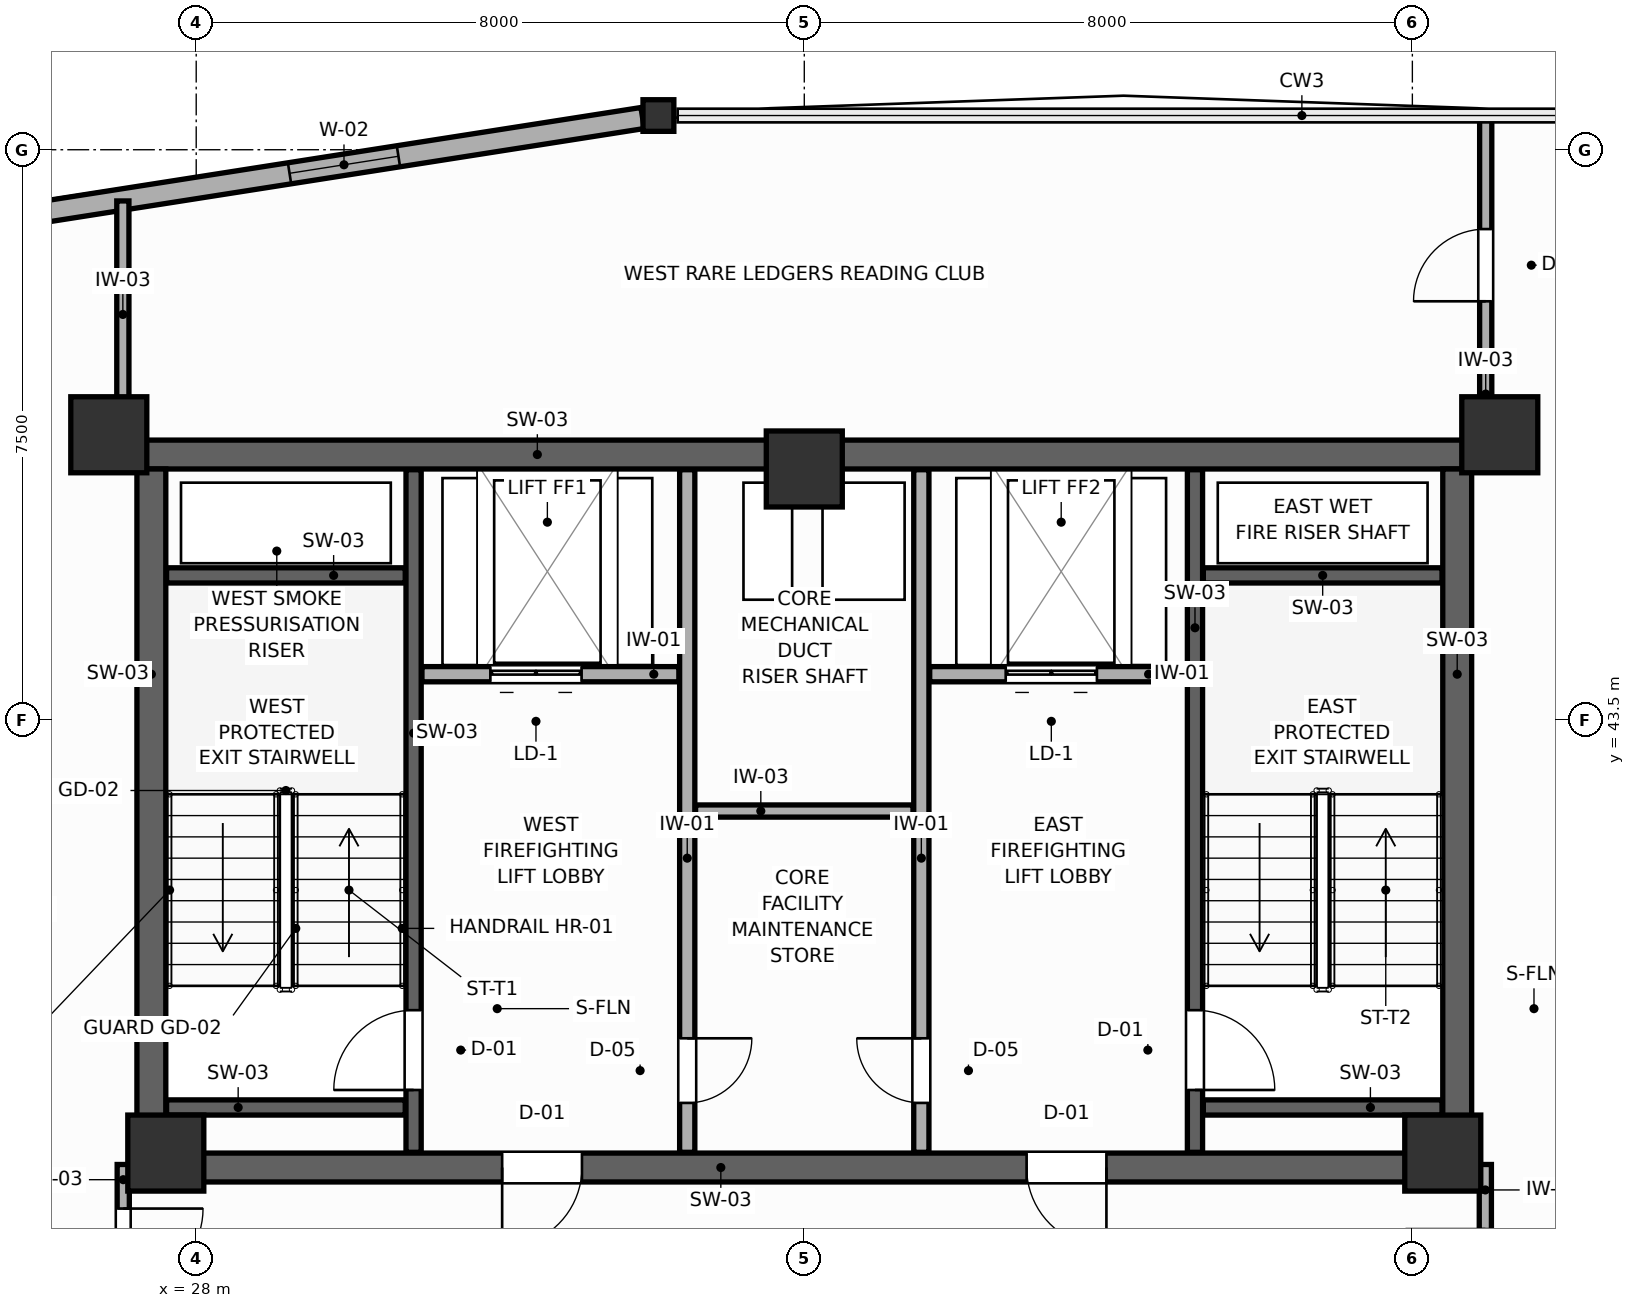
"""IFC4 building model, lengths in metres.
Left out: names, types, materials, properties, quantities, classifications, styles, units other than length and angle.
Written with IfcOpenShell. Run it as: python <this file> out.ifc"""

import sys

from ifc_helpers import new_model, si_unit, direction, frame, frame_2d, origin, origin_2d, place, context, subcontext, project, spatial, rectangle, i_section, extrude, source, transform, mapped, element, fill, save


model = new_model("IFC4")
c1 = context("Model", 3, precision=1e-05, world=origin(), true_north=direction((0.0, 1.0)))
c2 = subcontext(c1, "Body", "Model", "MODEL_VIEW")
j1 = project(units=[si_unit("LENGTHUNIT", "METRE"), si_unit("PLANEANGLEUNIT", "RADIAN")], contexts=[c1])
p1 = place(None, origin())
s1 = spatial("IfcSite", under=j1, at=p1, CompositionType="ELEMENT")
p2 = place(p1, origin())
s2 = spatial("IfcBuilding", under=s1, at=p2, CompositionType="ELEMENT")
p3 = place(p2, frame((0.0, 0.0, 216.6)))
s3 = spatial("IfcBuildingStorey", under=s2, at=p3, CompositionType="ELEMENT", Elevation=216.6)
p4 = place(p3, frame((27.22, 46.99, 0.0), z_axis=(0.0, 0.0, 1.0), x_axis=(1.0, 0.0, 0.0)))
e1 = element("IfcWall", 1, at=p4, inside=s3, PredefinedType="SHEAR", context=c2, shape_type="SweptSolid", body=[
    extrude(rectangle(XDim=17.56, YDim=0.38, at=frame_2d((8.78, 0.0))), origin(), (0.0, 0.0, 1.0), 3.6),
])
p5 = place(p3, frame((27.22, 37.61, 0.0), z_axis=(0.0, 0.0, 1.0), x_axis=(1.0, 0.0, 0.0)))
e2 = element("IfcWall", 2, at=p5, inside=s3, PredefinedType="SHEAR", context=c2, shape_type="SweptSolid", body=[
    extrude(rectangle(XDim=17.56, YDim=0.38, at=frame_2d((8.78, 0.0))), origin(), (0.0, 0.0, 1.0), 3.6),
])
p6 = place(p5, frame((4.805, 0.0, 0.0)))
e3 = element("IfcOpeningElement", 3, at=p6, cuts=e2, PredefinedType="OPENING", context=c2, shape_type="SweptSolid", body=[
    extrude(rectangle(XDim=1.05, YDim=2.1, at=frame_2d((0.525, 1.05))), frame((0.0, 0.2, 0.0), z_axis=(0.0, -1.0, 0.0), x_axis=(1.0, 0.0, 0.0)), (0.0, 0.0, 1.0), 0.4),
])
p7 = place(p5, frame((11.705, 0.0, 0.0)))
e4 = element("IfcOpeningElement", 4, at=p7, cuts=e2, PredefinedType="OPENING", context=c2, shape_type="SweptSolid", body=[
    extrude(rectangle(XDim=1.05, YDim=2.1, at=frame_2d((0.525, 1.05))), frame((0.0, 0.2, 0.0), z_axis=(0.0, -1.0, 0.0), x_axis=(1.0, 0.0, 0.0)), (0.0, 0.0, 1.0), 0.4),
])
for number, where, z_axis, x_axis in (
    (5, (27.41, 37.8, 0.0), (0.0, 0.0, 1.0), (0.0, 1.0, 0.0)),
    (6, (44.59, 37.8, 0.0), (0.0, 0.0, 1.0), (0.0, 1.0, 0.0)),
):
    element("IfcWall", number, at=place(p3, frame(where, z_axis=z_axis, x_axis=x_axis)), inside=s3, PredefinedType="SHEAR", context=c2, shape_type="SweptSolid", body=[
        extrude(rectangle(XDim=9.0, YDim=0.38, at=frame_2d((4.5, 0.0))), origin(), (0.0, 0.0, 1.0), 3.6),
    ])
m1 = source(origin(), c2, "Body", "SweptSolid", [
    extrude(rectangle(XDim=1.0, YDim=1.0, at=origin_2d()), origin(), (0.0, 0.0, 1.0), 3.6),
])
for number, where, z_axis, x_axis in (
    (7, (26.85, 47.25, 0.0), (0.0, 0.0, 1.0), (1.0, 0.0, 0.0)),
    (8, (45.15, 47.25, 0.0), (0.0, 0.0, 1.0), (1.0, 0.0, 0.0)),
    (9, (27.6, 37.8, 0.0), (0.0, 0.0, 1.0), (1.0, 0.0, 0.0)),
    (10, (44.4, 37.8, 0.0), (0.0, 0.0, 1.0), (1.0, 0.0, 0.0)),
    (11, (36.0, 46.8, 0.0), (0.0, 0.0, 1.0), (1.0, 0.0, 0.0)),
):
    element("IfcColumn", number, at=place(p3, frame(where, z_axis=z_axis, x_axis=x_axis)), inside=s3, PredefinedType="COLUMN", context=c2, shape_type="MappedRepresentation", body=[
        mapped(m1, transform((0.0, 0.0, 0.0), scale=1.0)),
    ])
m2 = source(origin(), c2, "Body", "SweptSolid", [
    extrude(i_section(OverallWidth=0.406, OverallDepth=0.416, WebThickness=0.027, FlangeThickness=0.044, FilletRadius=0.015, at=origin_2d()), origin(), (0.0, 0.0, 1.0), 3.6),
])
p8 = place(p3, frame((34.081, 51.45, 0.0), z_axis=(0.0, 0.0, 1.0), x_axis=(1.0, 0.0, 0.0)))
e12 = element("IfcColumn", 12, at=p8, inside=s3, PredefinedType="COLUMN", context=c2, shape_type="MappedRepresentation", body=[
    mapped(m2, transform((0.0, 0.0, 0.0), scale=1.0)),
])
p9 = place(p3, frame((33.873, 51.417, 0.0), z_axis=(0.0, 0.0, 1.0), x_axis=(-0.987957437721, -0.154725890697, 0.0)))
e13 = element("IfcWall", 13, at=p9, inside=s3, PredefinedType="SOLIDWALL", context=c2, shape_type="SweptSolid", body=[
    extrude(rectangle(XDim=13.657, YDim=0.28, at=frame_2d((6.828, 0.0))), origin(), (0.0, 0.0, 1.0), 2.96),
])
p10 = place(p9, frame((3.252, 0.0, 0.75)))
e14 = element("IfcOpeningElement", 14, at=p10, cuts=e13, PredefinedType="OPENING", context=c2, shape_type="SweptSolid", body=[
    extrude(rectangle(XDim=1.45, YDim=1.65, at=frame_2d((0.725, 0.825))), frame((0.0, 0.15, 0.0), z_axis=(0.0, -1.0, 0.0), x_axis=(1.0, 0.0, 0.0)), (0.0, 0.0, 1.0), 0.3),
])
p11 = place(p3, frame((30.86, 37.81, 0.0), z_axis=(0.0, 0.0, 1.0), x_axis=(0.0, 1.0, 0.0)))
e15 = element("IfcWall", 15, at=p11, inside=s3, PredefinedType="SHEAR", context=c2, shape_type="SweptSolid", body=[
    extrude(rectangle(XDim=8.98, YDim=0.2, at=frame_2d((4.49, 0.0))), origin(), (0.0, 0.0, 1.0), 3.6),
])
p12 = place(p11, frame((0.82, 0.0, 0.0)))
e16 = element("IfcOpeningElement", 16, at=p12, cuts=e15, PredefinedType="OPENING", context=c2, shape_type="SweptSolid", body=[
    extrude(rectangle(XDim=1.05, YDim=2.1, at=frame_2d((0.525, 1.05))), frame((0.0, 0.11, 0.0), z_axis=(0.0, -1.0, 0.0), x_axis=(1.0, 0.0, 0.0)), (0.0, 0.0, 1.0), 0.22),
])
for number, where, z_axis, x_axis in (
    (17, (27.61, 45.4, 0.0), (0.0, 0.0, 1.0), (1.0, 0.0, 0.0)),
    (18, (27.61, 38.4, 0.0), (0.0, 0.0, 1.0), (1.0, 0.0, 0.0)),
):
    element("IfcWall", number, at=place(p3, frame(where, z_axis=z_axis, x_axis=x_axis)), inside=s3, PredefinedType="SHEAR", context=c2, shape_type="SweptSolid", body=[
        extrude(rectangle(XDim=3.14, YDim=0.2, at=frame_2d((1.57, 0.0))), origin(), (0.0, 0.0, 1.0), 3.6),
    ])
p13 = place(p3, frame((41.14, 37.81, 0.0), z_axis=(0.0, 0.0, 1.0), x_axis=(0.0, 1.0, 0.0)))
e19 = element("IfcWall", 19, at=p13, inside=s3, PredefinedType="SHEAR", context=c2, shape_type="SweptSolid", body=[
    extrude(rectangle(XDim=8.98, YDim=0.2, at=frame_2d((4.49, 0.0))), origin(), (0.0, 0.0, 1.0), 3.6),
])
p14 = place(p13, frame((0.82, 0.0, 0.0)))
e20 = element("IfcOpeningElement", 20, at=p14, cuts=e19, PredefinedType="OPENING", context=c2, shape_type="SweptSolid", body=[
    extrude(rectangle(XDim=1.05, YDim=2.1, at=frame_2d((0.525, 1.05))), frame((0.0, 0.11, 0.0), z_axis=(0.0, -1.0, 0.0), x_axis=(1.0, 0.0, 0.0)), (0.0, 0.0, 1.0), 0.22),
])
for number, where, z_axis, x_axis in (
    (21, (41.25, 45.4, 0.0), (0.0, 0.0, 1.0), (1.0, 0.0, 0.0)),
    (22, (41.25, 38.4, 0.0), (0.0, 0.0, 1.0), (1.0, 0.0, 0.0)),
):
    element("IfcWall", number, at=place(p3, frame(where, z_axis=z_axis, x_axis=x_axis)), inside=s3, PredefinedType="SHEAR", context=c2, shape_type="SweptSolid", body=[
        extrude(rectangle(XDim=3.14, YDim=0.2, at=frame_2d((1.57, 0.0))), origin(), (0.0, 0.0, 1.0), 3.6),
    ])
p15 = place(p3, frame((30.97, 44.1, 0.0), z_axis=(0.0, 0.0, 1.0), x_axis=(1.0, 0.0, 0.0)))
e23 = element("IfcWall", 23, at=p15, inside=s3, PredefinedType="PARTITIONING", context=c2, shape_type="SweptSolid", body=[
    extrude(rectangle(XDim=3.38, YDim=0.2, at=frame_2d((1.69, 0.0))), origin(), (0.0, 0.0, 1.0), 3.41),
])
p16 = place(p15, frame((0.9, 0.0, 0.0)))
e24 = element("IfcOpeningElement", 24, at=p16, cuts=e23, PredefinedType="OPENING", context=c2, shape_type="SweptSolid", body=[
    extrude(rectangle(XDim=1.2, YDim=2.1, at=frame_2d((0.6, 1.05))), frame((0.0, 0.11, 0.0), z_axis=(0.0, -1.0, 0.0), x_axis=(1.0, 0.0, 0.0)), (0.0, 0.0, 1.0), 0.22),
])
p17 = place(p3, frame((37.65, 44.1, 0.0), z_axis=(0.0, 0.0, 1.0), x_axis=(1.0, 0.0, 0.0)))
e25 = element("IfcWall", 25, at=p17, inside=s3, PredefinedType="PARTITIONING", context=c2, shape_type="SweptSolid", body=[
    extrude(rectangle(XDim=3.38, YDim=0.2, at=frame_2d((1.69, 0.0))), origin(), (0.0, 0.0, 1.0), 3.41),
])
p18 = place(p17, frame((1.0, 0.0, 0.0)))
e26 = element("IfcOpeningElement", 26, at=p18, cuts=e25, PredefinedType="OPENING", context=c2, shape_type="SweptSolid", body=[
    extrude(rectangle(XDim=1.2, YDim=2.1, at=frame_2d((0.6, 1.05))), frame((0.0, 0.11, 0.0), z_axis=(0.0, -1.0, 0.0), x_axis=(1.0, 0.0, 0.0)), (0.0, 0.0, 1.0), 0.22),
])
p19 = place(p3, frame((34.46, 37.81, 0.0), z_axis=(0.0, 0.0, 1.0), x_axis=(0.0, 1.0, 0.0)))
e27 = element("IfcWall", 27, at=p19, inside=s3, PredefinedType="PARTITIONING", context=c2, shape_type="SweptSolid", body=[
    extrude(rectangle(XDim=8.98, YDim=0.2, at=frame_2d((4.49, 0.0))), origin(), (0.0, 0.0, 1.0), 3.41),
])
p20 = place(p19, frame((0.65, 0.0, 0.0)))
e28 = element("IfcOpeningElement", 28, at=p20, cuts=e27, PredefinedType="OPENING", context=c2, shape_type="SweptSolid", body=[
    extrude(rectangle(XDim=0.85, YDim=2.05, at=frame_2d((0.425, 1.025))), frame((0.0, 0.11, 0.0), z_axis=(0.0, -1.0, 0.0), x_axis=(1.0, 0.0, 0.0)), (0.0, 0.0, 1.0), 0.22),
])
p21 = place(p3, frame((37.54, 37.81, 0.0), z_axis=(0.0, 0.0, 1.0), x_axis=(0.0, 1.0, 0.0)))
e29 = element("IfcWall", 29, at=p21, inside=s3, PredefinedType="PARTITIONING", context=c2, shape_type="SweptSolid", body=[
    extrude(rectangle(XDim=8.98, YDim=0.2, at=frame_2d((4.49, 0.0))), origin(), (0.0, 0.0, 1.0), 3.41),
])
p22 = place(p21, frame((0.65, 0.0, 0.0)))
e30 = element("IfcOpeningElement", 30, at=p22, cuts=e29, PredefinedType="OPENING", context=c2, shape_type="SweptSolid", body=[
    extrude(rectangle(XDim=0.85, YDim=2.05, at=frame_2d((0.425, 1.025))), frame((0.0, 0.11, 0.0), z_axis=(0.0, -1.0, 0.0), x_axis=(1.0, 0.0, 0.0)), (0.0, 0.0, 1.0), 0.22),
])
p23 = place(p3, frame((34.57, 42.3, 0.0), z_axis=(0.0, 0.0, 1.0), x_axis=(1.0, 0.0, 0.0)))
e31 = element("IfcWall", 31, at=p23, inside=s3, PredefinedType="PARTITIONING", context=c2, shape_type="SweptSolid", body=[
    extrude(rectangle(XDim=2.86, YDim=0.16, at=frame_2d((1.43, 0.0))), origin(), (0.0, 0.0, 1.0), 3.41),
])
p24 = place(p3, frame((27.04, 35.54, 0.0), z_axis=(0.0, 0.0, 1.0), x_axis=(0.0, 1.0, 0.0)))
e32 = element("IfcWall", 32, at=p24, inside=s3, PredefinedType="PARTITIONING", context=c2, shape_type="SweptSolid", body=[
    extrude(rectangle(XDim=2.11, YDim=0.16, at=frame_2d((1.055, 0.0))), origin(), (0.0, 0.0, 1.0), 3.41),
])
p25 = place(p24, frame((0.48, 0.0, 0.0)))
e33 = element("IfcOpeningElement", 33, at=p25, cuts=e32, PredefinedType="OPENING", context=c2, shape_type="SweptSolid", body=[
    extrude(rectangle(XDim=1.05, YDim=2.1, at=frame_2d((0.525, 1.05))), frame((0.0, 0.09, 0.0), z_axis=(0.0, -1.0, 0.0), x_axis=(1.0, 0.0, 0.0)), (0.0, 0.0, 1.0), 0.18),
])
p26 = place(p3, frame((44.96, 35.0, 0.0), z_axis=(0.0, 0.0, 1.0), x_axis=(0.0, 1.0, 0.0)))
e34 = element("IfcWall", 34, at=p26, inside=s3, PredefinedType="PARTITIONING", context=c2, shape_type="SweptSolid", body=[
    extrude(rectangle(XDim=2.65, YDim=0.16, at=frame_2d((1.325, 0.0))), origin(), (0.0, 0.0, 1.0), 3.41),
])
p27 = place(p26, frame((0.75, 0.0, 0.0)))
e35 = element("IfcOpeningElement", 35, at=p27, cuts=e34, PredefinedType="OPENING", context=c2, shape_type="SweptSolid", body=[
    extrude(rectangle(XDim=1.05, YDim=2.1, at=frame_2d((0.525, 1.05))), frame((0.0, 0.09, 0.0), z_axis=(0.0, -1.0, 0.0), x_axis=(1.0, 0.0, 0.0)), (0.0, 0.0, 1.0), 0.18),
])
p28 = place(p3, frame((44.965, 47.34, 0.0), z_axis=(0.0, 0.0, 1.0), x_axis=(0.0, 1.0, 0.0)))
e36 = element("IfcWall", 36, at=p28, inside=s3, PredefinedType="PARTITIONING", context=c2, shape_type="SweptSolid", body=[
    extrude(rectangle(XDim=4.09, YDim=0.16, at=frame_2d((2.045, 0.0))), origin(), (0.0, 0.0, 1.0), 3.41),
])
p29 = place(p28, frame((1.666, 0.0, 0.0)))
e37 = element("IfcOpeningElement", 37, at=p29, cuts=e36, PredefinedType="OPENING", context=c2, shape_type="SweptSolid", body=[
    extrude(rectangle(XDim=0.95, YDim=2.05, at=frame_2d((0.475, 1.025))), frame((0.0, 0.09, 0.0), z_axis=(0.0, -1.0, 0.0), x_axis=(1.0, 0.0, 0.0)), (0.0, 0.0, 1.0), 0.18),
])
p30 = place(p3, frame((27.035, 47.34, 0.0), z_axis=(0.0, 0.0, 1.0), x_axis=(0.0, 1.0, 0.0)))
e38 = element("IfcWall", 38, at=p30, inside=s3, PredefinedType="PARTITIONING", context=c2, shape_type="SweptSolid", body=[
    extrude(rectangle(XDim=2.986, YDim=0.16, at=frame_2d((1.493, 0.0))), origin(), (0.0, 0.0, 1.0), 3.41),
])
p31 = place(p10, origin())
e39 = element("IfcWindow", 39, at=p31, inside=s3, PartitioningType="SINGLE_PANEL", PredefinedType="WINDOW", context=c2, shape_type="SweptSolid", body=[
    extrude(rectangle(XDim=1.45, YDim=1.65, at=frame_2d((0.725, 0.825))), frame((0.0, 0.03, 0.0), z_axis=(0.0, -1.0, 0.0), x_axis=(1.0, 0.0, 0.0)), (0.0, 0.0, 1.0), 0.06),
])
fill(e14, e39)
p32 = place(p12, origin())
e40 = element("IfcDoor", 40, at=p32, inside=s3, OperationType="SINGLE_SWING_LEFT", PredefinedType="DOOR", context=c2, shape_type="SweptSolid", body=[
    extrude(rectangle(XDim=1.05, YDim=2.1, at=frame_2d((0.525, 1.05))), frame((0.0, 0.025, 0.0), z_axis=(0.0, -1.0, 0.0), x_axis=(1.0, 0.0, 0.0)), (0.0, 0.0, 1.0), 0.05),
])
fill(e16, e40)
p33 = place(p14, frame((1.05, 0.0, 0.0), z_axis=(0.0, 0.0, 1.0), x_axis=(-1.0, 0.0, 0.0)))
e41 = element("IfcDoor", 41, at=p33, inside=s3, OperationType="SINGLE_SWING_RIGHT", PredefinedType="DOOR", context=c2, shape_type="SweptSolid", body=[
    extrude(rectangle(XDim=1.05, YDim=2.1, at=frame_2d((0.525, 1.05))), frame((0.0, 0.025, 0.0), z_axis=(0.0, -1.0, 0.0), x_axis=(1.0, 0.0, 0.0)), (0.0, 0.0, 1.0), 0.05),
])
fill(e20, e41)
p34 = place(p16, origin())
e42 = element("IfcDoor", 42, at=p34, inside=s3, OperationType="DOUBLE_DOOR_SLIDING", PredefinedType="DOOR", context=c2, shape_type="SweptSolid", body=[
    extrude(rectangle(XDim=1.2, YDim=2.1, at=frame_2d((0.6, 1.05))), frame((0.0, 0.025, 0.0), z_axis=(0.0, -1.0, 0.0), x_axis=(1.0, 0.0, 0.0)), (0.0, 0.0, 1.0), 0.05),
])
fill(e24, e42)
p35 = place(p18, origin())
e43 = element("IfcDoor", 43, at=p35, inside=s3, OperationType="DOUBLE_DOOR_SLIDING", PredefinedType="DOOR", context=c2, shape_type="SweptSolid", body=[
    extrude(rectangle(XDim=1.2, YDim=2.1, at=frame_2d((0.6, 1.05))), frame((0.0, 0.025, 0.0), z_axis=(0.0, -1.0, 0.0), x_axis=(1.0, 0.0, 0.0)), (0.0, 0.0, 1.0), 0.05),
])
fill(e26, e43)
p36 = place(p20, frame((0.85, 0.0, 0.0), z_axis=(0.0, 0.0, 1.0), x_axis=(-1.0, 0.0, 0.0)))
e44 = element("IfcDoor", 44, at=p36, inside=s3, OperationType="SINGLE_SWING_LEFT", PredefinedType="DOOR", context=c2, shape_type="SweptSolid", body=[
    extrude(rectangle(XDim=0.85, YDim=2.05, at=frame_2d((0.425, 1.025))), frame((0.0, 0.025, 0.0), z_axis=(0.0, -1.0, 0.0), x_axis=(1.0, 0.0, 0.0)), (0.0, 0.0, 1.0), 0.05),
])
fill(e28, e44)
p37 = place(p22, origin())
e45 = element("IfcDoor", 45, at=p37, inside=s3, OperationType="SINGLE_SWING_RIGHT", PredefinedType="DOOR", context=c2, shape_type="SweptSolid", body=[
    extrude(rectangle(XDim=0.85, YDim=2.05, at=frame_2d((0.425, 1.025))), frame((0.0, 0.025, 0.0), z_axis=(0.0, -1.0, 0.0), x_axis=(1.0, 0.0, 0.0)), (0.0, 0.0, 1.0), 0.05),
])
fill(e30, e45)
p38 = place(p25, frame((1.05, 0.0, 0.0), z_axis=(0.0, 0.0, 1.0), x_axis=(-1.0, 0.0, 0.0)))
e46 = element("IfcDoor", 46, at=p38, inside=s3, OperationType="SINGLE_SWING_LEFT", PredefinedType="DOOR", context=c2, shape_type="SweptSolid", body=[
    extrude(rectangle(XDim=1.05, YDim=2.1, at=frame_2d((0.525, 1.05))), frame((0.0, 0.025, 0.0), z_axis=(0.0, -1.0, 0.0), x_axis=(1.0, 0.0, 0.0)), (0.0, 0.0, 1.0), 0.05),
])
fill(e33, e46)
p39 = place(p29, origin())
e47 = element("IfcDoor", 47, at=p39, inside=s3, OperationType="SINGLE_SWING_LEFT", PredefinedType="DOOR", context=c2, shape_type="SweptSolid", body=[
    extrude(rectangle(XDim=0.95, YDim=2.05, at=frame_2d((0.475, 1.025))), frame((0.0, 0.025, 0.0), z_axis=(0.0, -1.0, 0.0), x_axis=(1.0, 0.0, 0.0)), (0.0, 0.0, 1.0), 0.05),
])
fill(e37, e47)
p40 = place(p6, frame((1.05, 0.0, 0.0), z_axis=(0.0, 0.0, 1.0), x_axis=(-1.0, 0.0, 0.0)))
e48 = element("IfcDoor", 48, at=p40, inside=s3, OperationType="SINGLE_SWING_RIGHT", PredefinedType="DOOR", context=c2, shape_type="SweptSolid", body=[
    extrude(rectangle(XDim=1.05, YDim=2.1, at=frame_2d((0.525, 1.05))), frame((0.0, 0.025, 0.0), z_axis=(0.0, -1.0, 0.0), x_axis=(1.0, 0.0, 0.0)), (0.0, 0.0, 1.0), 0.05),
])
fill(e3, e48)
p41 = place(p7, frame((1.05, 0.0, 0.0), z_axis=(0.0, 0.0, 1.0), x_axis=(-1.0, 0.0, 0.0)))
e49 = element("IfcDoor", 49, at=p41, inside=s3, OperationType="SINGLE_SWING_LEFT", PredefinedType="DOOR", context=c2, shape_type="SweptSolid", body=[
    extrude(rectangle(XDim=1.05, YDim=2.1, at=frame_2d((0.525, 1.05))), frame((0.0, 0.025, 0.0), z_axis=(0.0, -1.0, 0.0), x_axis=(1.0, 0.0, 0.0)), (0.0, 0.0, 1.0), 0.05),
])
fill(e4, e49)
save(model, sys.argv[1])
